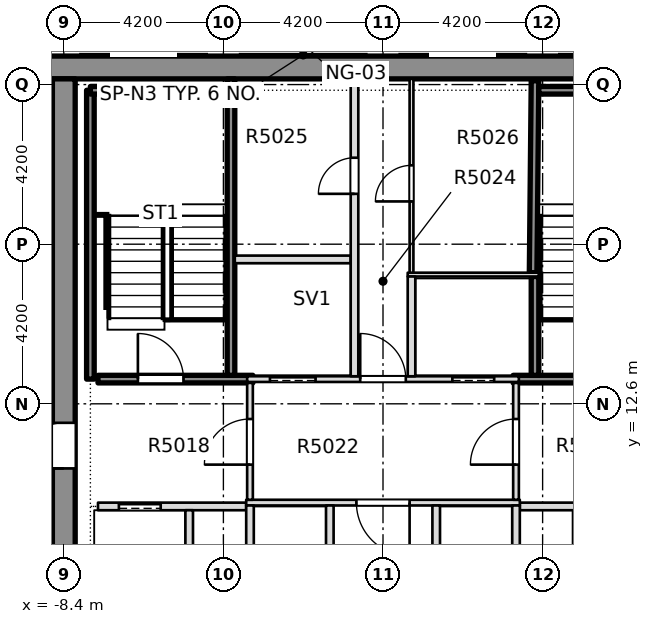
"""IFC4 building model, lengths in metres.
Left out: names, types, materials, properties, quantities, classifications, styles, units other than length and angle.
Written with IfcOpenShell. Run it as: python <this file> out.ifc"""

import sys

from ifc_helpers import new_model, si_unit, direction, frame, frame_2d, origin, place, context, subcontext, project, spatial, rectangle, extrude, element, fill, save


model = new_model("IFC4")
c1 = context("Model", 3, precision=1e-05, world=origin(), true_north=direction((0.0, 1.0)))
c2 = subcontext(c1, "Body", "Model", "MODEL_VIEW")
j1 = project(units=[si_unit("LENGTHUNIT", "METRE"), si_unit("PLANEANGLEUNIT", "RADIAN")], contexts=[c1])
p1 = place(None, origin())
s1 = spatial("IfcSite", under=j1, at=p1, CompositionType="ELEMENT")
p2 = place(p1, origin())
s2 = spatial("IfcBuilding", under=s1, at=p2, CompositionType="ELEMENT")
p3 = place(p2, frame((0.0, 0.0, 192.8)))
s3 = spatial("IfcBuildingStorey", under=s2, at=p3, CompositionType="ELEMENT", Elevation=192.8)
p4 = place(p3, frame((-12.0, 21.45, -0.4), z_axis=(0.0, 0.0, 1.0), x_axis=(1.0, 0.0, 0.0)))
e1 = element("IfcWall", 1, at=p4, inside=s3, PredefinedType="SHEAR", context=c2, shape_type="SweptSolid", body=[
    extrude(rectangle(XDim=24.0, YDim=0.6, at=frame_2d((12.0, 0.0))), origin(), (0.0, 0.0, 1.0), 3.45),
])
p5 = place(p3, frame((-8.4, -7.8, -0.4), z_axis=(0.0, 0.0, 1.0), x_axis=(0.0, 1.0, 0.0)))
e2 = element("IfcWall", 2, at=p5, inside=s3, PredefinedType="SHEAR", context=c2, shape_type="SweptSolid", body=[
    extrude(rectangle(XDim=28.95, YDim=0.6, at=frame_2d((14.475, 0.0))), origin(), (0.0, 0.0, 1.0), 3.45),
])
p6 = place(p5, frame((18.7, 0.0, 0.4)))
e3 = element("IfcOpeningElement", 3, at=p6, cuts=e2, PredefinedType="OPENING", context=c2, shape_type="SweptSolid", body=[
    extrude(rectangle(XDim=1.2, YDim=2.1, at=frame_2d((0.6, 1.05))), frame((0.0, 0.31, 0.0), z_axis=(0.0, -1.0, 0.0), x_axis=(1.0, 0.0, 0.0)), (0.0, 0.0, 1.0), 0.62),
])
p7 = place(p3, frame((-7.5, 9.9, 0.0), z_axis=(0.0, 0.0, 1.0), x_axis=(1.0, 0.0, 0.0)))
e4 = element("IfcWall", 4, at=p7, inside=s3, PredefinedType="PARTITIONING", context=c2, shape_type="SweptSolid", body=[
    extrude(rectangle(XDim=3.9, YDim=0.2, at=frame_2d((1.95, 0.0))), origin(), (0.0, 0.0, 1.0), 3.05),
])
p8 = place(p7, frame((0.55, 0.0, 0.0)))
e5 = element("IfcOpeningElement", 5, at=p8, cuts=e4, PredefinedType="OPENING", context=c2, shape_type="SweptSolid", body=[
    extrude(rectangle(XDim=1.1, YDim=2.1, at=frame_2d((0.55, 1.05))), frame((0.0, 0.11, 0.0), z_axis=(0.0, -1.0, 0.0), x_axis=(1.0, 0.0, 0.0)), (0.0, 0.0, 1.0), 0.22),
])
p9 = place(p3, frame((3.6, 9.9, 0.0), z_axis=(0.0, 0.0, 1.0), x_axis=(1.0, 0.0, 0.0)))
e6 = element("IfcWall", 6, at=p9, inside=s3, PredefinedType="PARTITIONING", context=c2, shape_type="SweptSolid", body=[
    extrude(rectangle(XDim=3.9, YDim=0.2, at=frame_2d((1.95, 0.0))), origin(), (0.0, 0.0, 1.0), 3.05),
])
p10 = place(p9, frame((2.25, 0.0, 0.0)))
e7 = element("IfcOpeningElement", 7, at=p10, cuts=e6, PredefinedType="OPENING", context=c2, shape_type="SweptSolid", body=[
    extrude(rectangle(XDim=1.1, YDim=2.1, at=frame_2d((0.55, 1.05))), frame((0.0, 0.11, 0.0), z_axis=(0.0, -1.0, 0.0), x_axis=(1.0, 0.0, 0.0)), (0.0, 0.0, 1.0), 0.22),
])
p11 = place(p3, frame((-3.6, 10.0, 0.0), z_axis=(0.0, 0.0, 1.0), x_axis=(1.0, 0.0, 0.0)))
e8 = element("IfcWall", 8, at=p11, inside=s3, PredefinedType="PARTITIONING", context=c2, shape_type="SweptSolid", body=[
    extrude(rectangle(XDim=7.2, YDim=0.15, at=frame_2d((3.6, 0.0))), origin(), (0.0, 0.0, 1.0), 3.05),
])
p12 = place(p11, frame((2.9, 0.0, 0.0)))
e9 = element("IfcOpeningElement", 9, at=p12, cuts=e8, PredefinedType="OPENING", context=c2, shape_type="SweptSolid", body=[
    extrude(rectangle(XDim=1.4, YDim=2.1, at=frame_2d((0.7, 1.05))), frame((0.0, 0.085, 0.0), z_axis=(0.0, -1.0, 0.0), x_axis=(1.0, 0.0, 0.0)), (0.0, 0.0, 1.0), 0.17),
])
p13 = place(p3, frame((-7.5, 13.25, 0.0), z_axis=(0.0, 0.0, 1.0), x_axis=(1.0, 0.0, 0.0)))
e10 = element("IfcWall", 10, at=p13, inside=s3, PredefinedType="SOLIDWALL", context=c2, shape_type="SweptSolid", body=[
    extrude(rectangle(XDim=4.075, YDim=0.2, at=frame_2d((2.038, 0.0))), origin(), (0.0, 0.0, 1.0), 3.05),
])
p14 = place(p13, frame((1.05, 0.0, 0.0)))
e11 = element("IfcOpeningElement", 11, at=p14, cuts=e10, PredefinedType="OPENING", context=c2, shape_type="SweptSolid", body=[
    extrude(rectangle(XDim=1.2, YDim=2.1, at=frame_2d((0.6, 1.05))), frame((0.0, 0.11, 0.0), z_axis=(0.0, -1.0, 0.0), x_axis=(1.0, 0.0, 0.0)), (0.0, 0.0, 1.0), 0.22),
])
p15 = place(p3, frame((-3.575, 13.25, 0.0), z_axis=(0.0, 0.0, 1.0), x_axis=(1.0, 0.0, 0.0)))
e12 = element("IfcWall", 12, at=p15, inside=s3, PredefinedType="PARTITIONING", context=c2, shape_type="SweptSolid", body=[
    extrude(rectangle(XDim=7.15, YDim=0.15, at=frame_2d((3.575, 0.0))), origin(), (0.0, 0.0, 1.0), 3.05),
])
p16 = place(p15, frame((0.6, 0.0, 0.0)))
e13 = element("IfcOpeningElement", 13, at=p16, cuts=e12, PredefinedType="OPENING", context=c2, shape_type="SweptSolid", body=[
    extrude(rectangle(XDim=1.2, YDim=2.1, at=frame_2d((0.6, 1.05))), frame((0.0, 0.085, 0.0), z_axis=(0.0, -1.0, 0.0), x_axis=(1.0, 0.0, 0.0)), (0.0, 0.0, 1.0), 0.17),
])
p17 = place(p15, frame((5.4, 0.0, 0.0)))
e14 = element("IfcOpeningElement", 14, at=p17, cuts=e12, PredefinedType="OPENING", context=c2, shape_type="SweptSolid", body=[
    extrude(rectangle(XDim=1.1, YDim=2.1, at=frame_2d((0.55, 1.05))), frame((0.0, 0.085, 0.0), z_axis=(0.0, -1.0, 0.0), x_axis=(1.0, 0.0, 0.0)), (0.0, 0.0, 1.0), 0.17),
])
p18 = place(p15, frame((2.975, 0.0, 0.0)))
e15 = element("IfcOpeningElement", 15, at=p18, cuts=e12, PredefinedType="OPENING", context=c2, shape_type="SweptSolid", body=[
    extrude(rectangle(XDim=1.2, YDim=2.1, at=frame_2d((0.6, 1.05))), frame((0.0, 0.085, 0.0), z_axis=(0.0, -1.0, 0.0), x_axis=(1.0, 0.0, 0.0)), (0.0, 0.0, 1.0), 0.17),
])
p19 = place(p3, frame((3.425, 13.25, 0.0), z_axis=(0.0, 0.0, 1.0), x_axis=(1.0, 0.0, 0.0)))
e16 = element("IfcWall", 16, at=p19, inside=s3, PredefinedType="SOLIDWALL", context=c2, shape_type="SweptSolid", body=[
    extrude(rectangle(XDim=4.075, YDim=0.2, at=frame_2d((2.038, 0.0))), origin(), (0.0, 0.0, 1.0), 3.05),
])
p20 = place(p19, frame((1.825, 0.0, 0.0)))
e17 = element("IfcOpeningElement", 17, at=p20, cuts=e16, PredefinedType="OPENING", context=c2, shape_type="SweptSolid", body=[
    extrude(rectangle(XDim=1.2, YDim=2.1, at=frame_2d((0.6, 1.05))), frame((0.0, 0.11, 0.0), z_axis=(0.0, -1.0, 0.0), x_axis=(1.0, 0.0, 0.0)), (0.0, 0.0, 1.0), 0.22),
])
p21 = place(p3, frame((0.65, 16.0, 0.0), z_axis=(0.0, 0.0, 1.0), x_axis=(1.0, 0.0, 0.0)))
e18 = element("IfcWall", 18, at=p21, inside=s3, PredefinedType="PARTITIONING", context=c2, shape_type="SweptSolid", body=[
    extrude(rectangle(XDim=3.45, YDim=0.1, at=frame_2d((1.725, 0.0))), origin(), (0.0, 0.0, 1.0), 3.05),
])
p22 = place(p3, frame((-3.9, 16.4, 0.0), z_axis=(0.0, 0.0, 1.0), x_axis=(1.0, 0.0, 0.0)))
e19 = element("IfcWall", 19, at=p22, inside=s3, PredefinedType="PARTITIONING", context=c2, shape_type="SweptSolid", body=[
    extrude(rectangle(XDim=3.05, YDim=0.2, at=frame_2d((1.525, 0.0))), origin(), (0.0, 0.0, 1.0), 3.05),
])
p23 = place(p3, frame((-5.1, 7.075, 0.0), z_axis=(0.0, 0.0, 1.0), x_axis=(0.0, 1.0, 0.0)))
e20 = element("IfcWall", 20, at=p23, inside=s3, PredefinedType="PARTITIONING", context=c2, shape_type="SweptSolid", body=[
    extrude(rectangle(XDim=2.725, YDim=0.2, at=frame_2d((1.363, 0.0))), origin(), (0.0, 0.0, 1.0), 3.05),
])
p24 = place(p3, frame((-4.0, 13.35, 0.0), z_axis=(0.0, 0.0, 1.0), x_axis=(0.0, 1.0, 0.0)))
e21 = element("IfcWall", 21, at=p24, inside=s3, PredefinedType="SOLIDWALL", context=c2, shape_type="SweptSolid", body=[
    extrude(rectangle(XDim=7.799, YDim=0.2, at=frame_2d((3.899, 0.0))), origin(), (0.0, 0.0, 1.0), 3.05),
])
p25 = place(p3, frame((-3.5, 7.075, 0.0), z_axis=(0.0, 0.0, 1.0), x_axis=(0.0, 1.0, 0.0)))
e22 = element("IfcWall", 22, at=p25, inside=s3, PredefinedType="PARTITIONING", context=c2, shape_type="SweptSolid", body=[
    extrude(rectangle(XDim=2.85, YDim=0.2, at=frame_2d((1.425, 0.0))), origin(), (0.0, 0.0, 1.0), 3.05),
])
p26 = place(p3, frame((-3.5, 10.075, 0.0), z_axis=(0.0, 0.0, 1.0), x_axis=(0.0, 1.0, 0.0)))
e23 = element("IfcWall", 23, at=p26, inside=s3, PredefinedType="PARTITIONING", context=c2, shape_type="SweptSolid", body=[
    extrude(rectangle(XDim=3.075, YDim=0.15, at=frame_2d((1.538, 0.0))), origin(), (0.0, 0.0, 1.0), 3.05),
])
p27 = place(p26, frame((0.925, 0.0, 0.0)))
e24 = element("IfcOpeningElement", 24, at=p27, cuts=e23, PredefinedType="OPENING", context=c2, shape_type="SweptSolid", body=[
    extrude(rectangle(XDim=1.2, YDim=2.1, at=frame_2d((0.6, 1.05))), frame((0.0, 0.085, 0.0), z_axis=(0.0, -1.0, 0.0), x_axis=(1.0, 0.0, 0.0)), (0.0, 0.0, 1.0), 0.17),
])
p28 = place(p3, frame((-1.4, 7.075, 0.0), z_axis=(0.0, 0.0, 1.0), x_axis=(0.0, 1.0, 0.0)))
e25 = element("IfcWall", 25, at=p28, inside=s3, PredefinedType="PARTITIONING", context=c2, shape_type="SweptSolid", body=[
    extrude(rectangle(XDim=2.85, YDim=0.2, at=frame_2d((1.425, 0.0))), origin(), (0.0, 0.0, 1.0), 3.05),
])
p29 = place(p3, frame((-0.75, 13.325, 0.0), z_axis=(0.0, 0.0, 1.0), x_axis=(0.0, 1.0, 0.0)))
e26 = element("IfcWall", 26, at=p29, inside=s3, PredefinedType="PARTITIONING", context=c2, shape_type="SweptSolid", body=[
    extrude(rectangle(XDim=7.824, YDim=0.2, at=frame_2d((3.912, 0.0))), origin(), (0.0, 0.0, 1.0), 3.05),
])
p30 = place(p29, frame((4.8, 0.0, 0.0)))
e27 = element("IfcOpeningElement", 27, at=p30, cuts=e26, PredefinedType="OPENING", context=c2, shape_type="SweptSolid", body=[
    extrude(rectangle(XDim=0.95, YDim=2.1, at=frame_2d((0.475, 1.05))), frame((0.0, 0.11, 0.0), z_axis=(0.0, -1.0, 0.0), x_axis=(1.0, 0.0, 0.0)), (0.0, 0.0, 1.0), 0.22),
])
p31 = place(p3, frame((0.75, 13.325, 0.0), z_axis=(0.0, 0.0, 1.0), x_axis=(0.0, 1.0, 0.0)))
e28 = element("IfcWall", 28, at=p31, inside=s3, PredefinedType="PARTITIONING", context=c2, shape_type="SweptSolid", body=[
    extrude(rectangle(XDim=2.625, YDim=0.2, at=frame_2d((1.312, 0.0))), origin(), (0.0, 0.0, 1.0), 3.05),
])
p32 = place(p3, frame((0.75, 16.05, 0.0), z_axis=(0.0, 0.0, 1.0), x_axis=(0.0, 1.0, 0.0)))
e29 = element("IfcWall", 29, at=p32, inside=s3, PredefinedType="PARTITIONING", context=c2, shape_type="SweptSolid", body=[
    extrude(rectangle(XDim=5.099, YDim=0.1, at=frame_2d((2.549, 0.0))), origin(), (0.0, 0.0, 1.0), 3.05),
])
p33 = place(p32, frame((1.875, 0.0, 0.0)))
e30 = element("IfcOpeningElement", 30, at=p33, cuts=e29, PredefinedType="OPENING", context=c2, shape_type="SweptSolid", body=[
    extrude(rectangle(XDim=0.95, YDim=2.1, at=frame_2d((0.475, 1.05))), frame((0.0, 0.06, 0.0), z_axis=(0.0, -1.0, 0.0), x_axis=(1.0, 0.0, 0.0)), (0.0, 0.0, 1.0), 0.12),
])
for number, where, z_axis, x_axis in (
    (31, (1.4, 7.075, 0.0), (0.0, 0.0, 1.0), (0.0, 1.0, 0.0)),
    (32, (3.5, 7.075, 0.0), (0.0, 0.0, 1.0), (0.0, 1.0, 0.0)),
):
    element("IfcWall", number, at=place(p3, frame(where, z_axis=z_axis, x_axis=x_axis)), inside=s3, PredefinedType="PARTITIONING", context=c2, shape_type="SweptSolid", body=[
        extrude(rectangle(XDim=2.85, YDim=0.2, at=frame_2d((1.425, 0.0))), origin(), (0.0, 0.0, 1.0), 3.05),
    ])
p34 = place(p3, frame((3.5, 10.075, 0.0), z_axis=(0.0, 0.0, 1.0), x_axis=(0.0, 1.0, 0.0)))
e33 = element("IfcWall", 33, at=p34, inside=s3, PredefinedType="PARTITIONING", context=c2, shape_type="SweptSolid", body=[
    extrude(rectangle(XDim=3.075, YDim=0.15, at=frame_2d((1.538, 0.0))), origin(), (0.0, 0.0, 1.0), 3.05),
])
p35 = place(p34, frame((0.925, 0.0, 0.0)))
e34 = element("IfcOpeningElement", 34, at=p35, cuts=e33, PredefinedType="OPENING", context=c2, shape_type="SweptSolid", body=[
    extrude(rectangle(XDim=1.2, YDim=2.1, at=frame_2d((0.6, 1.05))), frame((0.0, 0.085, 0.0), z_axis=(0.0, -1.0, 0.0), x_axis=(1.0, 0.0, 0.0)), (0.0, 0.0, 1.0), 0.17),
])
p36 = place(p3, frame((4.0, 13.35, 0.0), z_axis=(0.0, 0.0, 1.0), x_axis=(0.0, 1.0, 0.0)))
e35 = element("IfcWall", 35, at=p36, inside=s3, PredefinedType="SOLIDWALL", context=c2, shape_type="SweptSolid", body=[
    extrude(rectangle(XDim=2.6, YDim=0.2, at=frame_2d((1.3, 0.0))), origin(), (0.0, 0.0, 1.0), 3.05),
])
p37 = place(p3, frame((3.95, 16.05, 0.0), z_axis=(0.0, 0.0, 1.0), x_axis=(0.009911993103, 0.99995087499, 0.0)))
e36 = element("IfcWall", 36, at=p37, inside=s3, PredefinedType="SOLIDWALL", context=c2, shape_type="SweptSolid", body=[
    extrude(rectangle(XDim=5.049, YDim=0.2, at=frame_2d((2.525, 0.0))), origin(), (0.0, 0.0, 1.0), 3.05),
])
p38 = place(p3, frame((-7.7, 13.25, 0.0), z_axis=(0.0, 0.0, 1.0), x_axis=(0.0, 1.0, 0.0)))
e37 = element("IfcWall", 37, at=p38, inside=s3, PredefinedType="SOLIDWALL", context=c2, shape_type="SweptSolid", body=[
    extrude(rectangle(XDim=7.6, YDim=0.2, at=frame_2d((3.8, 0.0))), origin(), (0.0, 0.0, 1.0), 3.05),
])
p39 = place(p3, frame((-7.7, 20.85, 0.0), z_axis=(0.0, 0.0, 1.0), x_axis=(1.0, 0.0, 0.0)))
e38 = element("IfcWall", 38, at=p39, inside=s3, PredefinedType="SOLIDWALL", context=c2, shape_type="SweptSolid", body=[
    extrude(rectangle(XDim=3.55, YDim=0.2, at=frame_2d((1.775, 0.0))), origin(), (0.0, 0.0, 1.0), 3.05),
])
p40 = place(p3, frame((4.1, 20.85, 0.0), z_axis=(0.0, 0.0, 1.0), x_axis=(1.0, 0.0, 0.0)))
e39 = element("IfcWall", 39, at=p40, inside=s3, PredefinedType="SOLIDWALL", context=c2, shape_type="SweptSolid", body=[
    extrude(rectangle(XDim=3.6, YDim=0.2, at=frame_2d((1.8, 0.0))), origin(), (0.0, 0.0, 1.0), 3.05),
])
p41 = place(p14, origin())
e40 = element("IfcDoor", 40, at=p41, inside=s3, OperationType="SINGLE_SWING_LEFT", PredefinedType="DOOR", context=c2, shape_type="SweptSolid", body=[
    extrude(rectangle(XDim=1.2, YDim=2.1, at=frame_2d((0.6, 1.05))), frame((0.0, 0.025, 0.0), z_axis=(0.0, -1.0, 0.0), x_axis=(1.0, 0.0, 0.0)), (0.0, 0.0, 1.0), 0.05),
])
fill(e11, e40)
p42 = place(p8, origin())
e41 = element("IfcDoor", 41, at=p42, inside=s3, OperationType="SLIDING_TO_RIGHT", PredefinedType="DOOR", context=c2, shape_type="SweptSolid", body=[
    extrude(rectangle(XDim=1.1, YDim=2.1, at=frame_2d((0.55, 1.05))), frame((0.0, 0.025, 0.0), z_axis=(0.0, -1.0, 0.0), x_axis=(1.0, 0.0, 0.0)), (0.0, 0.0, 1.0), 0.05),
])
fill(e5, e41)
p43 = place(p12, origin())
e42 = element("IfcDoor", 42, at=p43, inside=s3, OperationType="SINGLE_SWING_RIGHT", PredefinedType="DOOR", context=c2, shape_type="SweptSolid", body=[
    extrude(rectangle(XDim=1.4, YDim=2.1, at=frame_2d((0.7, 1.05))), frame((0.0, 0.025, 0.0), z_axis=(0.0, -1.0, 0.0), x_axis=(1.0, 0.0, 0.0)), (0.0, 0.0, 1.0), 0.05),
])
fill(e9, e42)
p44 = place(p16, origin())
e43 = element("IfcDoor", 43, at=p44, inside=s3, OperationType="SLIDING_TO_RIGHT", PredefinedType="DOOR", context=c2, shape_type="SweptSolid", body=[
    extrude(rectangle(XDim=1.2, YDim=2.1, at=frame_2d((0.6, 1.05))), frame((0.0, 0.025, 0.0), z_axis=(0.0, -1.0, 0.0), x_axis=(1.0, 0.0, 0.0)), (0.0, 0.0, 1.0), 0.05),
])
fill(e13, e43)
p45 = place(p17, origin())
e44 = element("IfcDoor", 44, at=p45, inside=s3, OperationType="SLIDING_TO_LEFT", PredefinedType="DOOR", context=c2, shape_type="SweptSolid", body=[
    extrude(rectangle(XDim=1.1, YDim=2.1, at=frame_2d((0.55, 1.05))), frame((0.0, 0.025, 0.0), z_axis=(0.0, -1.0, 0.0), x_axis=(1.0, 0.0, 0.0)), (0.0, 0.0, 1.0), 0.05),
])
fill(e14, e44)
p46 = place(p18, origin())
e45 = element("IfcDoor", 45, at=p46, inside=s3, OperationType="SINGLE_SWING_RIGHT", PredefinedType="DOOR", context=c2, shape_type="SweptSolid", body=[
    extrude(rectangle(XDim=1.2, YDim=2.1, at=frame_2d((0.6, 1.05))), frame((0.0, 0.025, 0.0), z_axis=(0.0, -1.0, 0.0), x_axis=(1.0, 0.0, 0.0)), (0.0, 0.0, 1.0), 0.05),
])
fill(e15, e45)
p47 = place(p30, origin())
e46 = element("IfcDoor", 46, at=p47, inside=s3, OperationType="SINGLE_SWING_RIGHT", PredefinedType="DOOR", context=c2, shape_type="SweptSolid", body=[
    extrude(rectangle(XDim=0.95, YDim=2.1, at=frame_2d((0.475, 1.05))), frame((0.0, 0.025, 0.0), z_axis=(0.0, -1.0, 0.0), x_axis=(1.0, 0.0, 0.0)), (0.0, 0.0, 1.0), 0.05),
])
fill(e27, e46)
p48 = place(p33, origin())
e47 = element("IfcDoor", 47, at=p48, inside=s3, OperationType="SINGLE_SWING_LEFT", PredefinedType="DOOR", context=c2, shape_type="SweptSolid", body=[
    extrude(rectangle(XDim=0.95, YDim=2.1, at=frame_2d((0.475, 1.05))), frame((0.0, 0.025, 0.0), z_axis=(0.0, -1.0, 0.0), x_axis=(1.0, 0.0, 0.0)), (0.0, 0.0, 1.0), 0.05),
])
fill(e30, e47)
p49 = place(p27, origin())
e48 = element("IfcDoor", 48, at=p49, inside=s3, OperationType="SINGLE_SWING_RIGHT", PredefinedType="DOOR", context=c2, shape_type="SweptSolid", body=[
    extrude(rectangle(XDim=1.2, YDim=2.1, at=frame_2d((0.6, 1.05))), frame((0.0, 0.025, 0.0), z_axis=(0.0, -1.0, 0.0), x_axis=(1.0, 0.0, 0.0)), (0.0, 0.0, 1.0), 0.05),
])
fill(e24, e48)
p50 = place(p35, origin())
e49 = element("IfcDoor", 49, at=p50, inside=s3, OperationType="SINGLE_SWING_LEFT", PredefinedType="DOOR", context=c2, shape_type="SweptSolid", body=[
    extrude(rectangle(XDim=1.2, YDim=2.1, at=frame_2d((0.6, 1.05))), frame((0.0, 0.025, 0.0), z_axis=(0.0, -1.0, 0.0), x_axis=(1.0, 0.0, 0.0)), (0.0, 0.0, 1.0), 0.05),
])
fill(e34, e49)
p51 = place(p6, origin())
e50 = element("IfcDoor", 50, at=p51, inside=s3, OperationType="SINGLE_SWING_LEFT", PredefinedType="DOOR", context=c2, shape_type="SweptSolid", body=[
    extrude(rectangle(XDim=1.2, YDim=2.1, at=frame_2d((0.6, 1.05))), frame((0.0, 0.025, 0.0), z_axis=(0.0, -1.0, 0.0), x_axis=(1.0, 0.0, 0.0)), (0.0, 0.0, 1.0), 0.05),
])
fill(e3, e50)
save(model, sys.argv[1])
